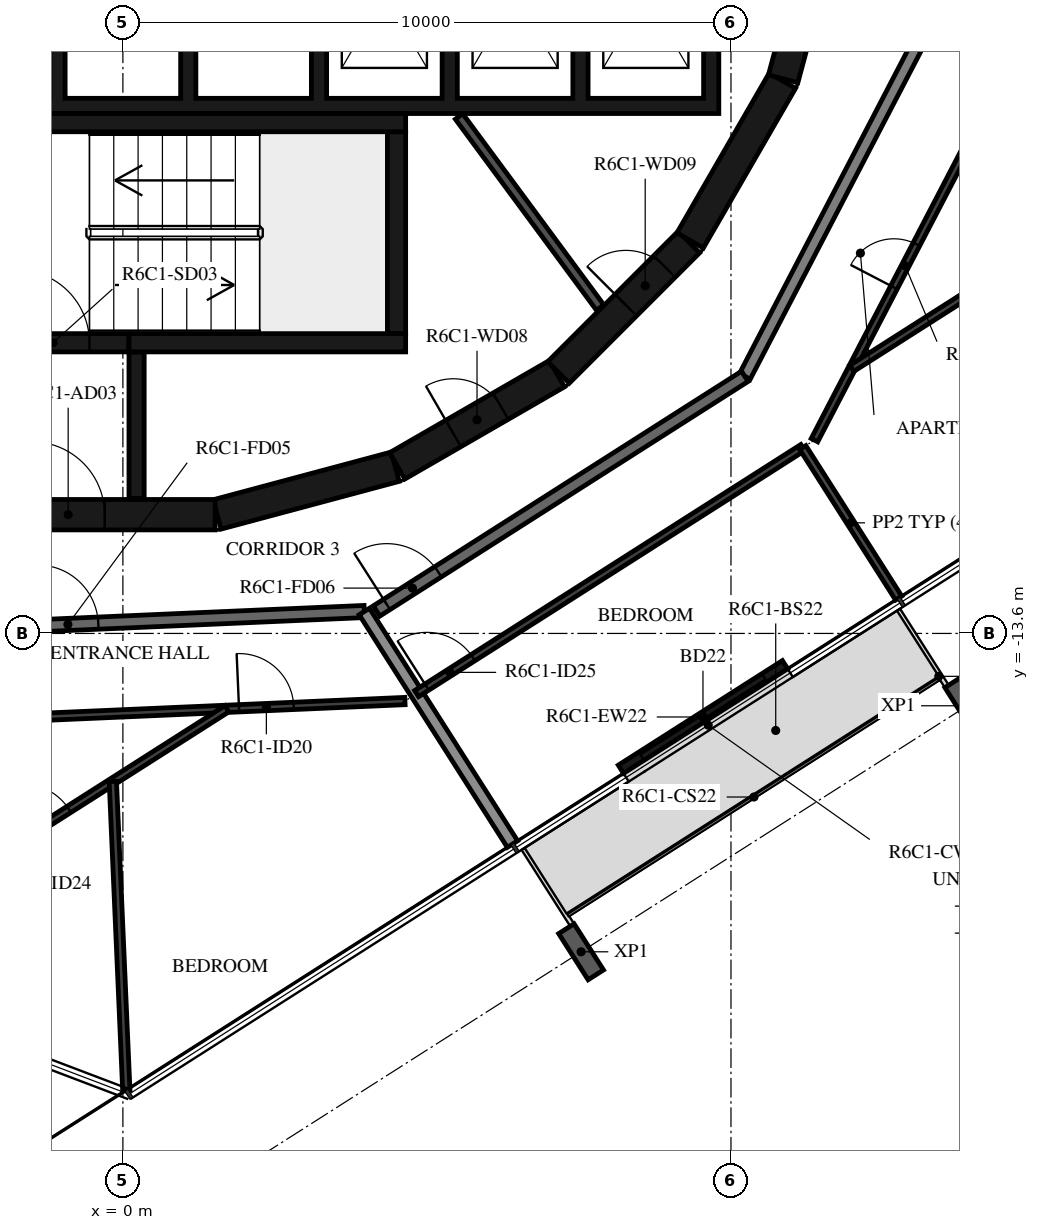
"""IFC4 building model, lengths in metres.
Left out: names, types, materials, properties, quantities, classifications, styles, units other than length and angle.
Written with IfcOpenShell. Run it as: python <this file> out.ifc"""

import sys

from ifc_helpers import new_model, si_unit, direction, frame, frame_2d, origin, origin_2d, place, context, subcontext, project, spatial, polyline, rectangle, i_section, outline, extrude, element, fill, save


model = new_model("IFC4")
c1 = context("Model", 3, precision=1e-05, world=origin(), true_north=direction((0.0, 1.0)))
c2 = subcontext(c1, "Body", "Model", "MODEL_VIEW")
j1 = project(units=[si_unit("LENGTHUNIT", "METRE"), si_unit("PLANEANGLEUNIT", "RADIAN")], contexts=[c1])
p1 = place(None, origin())
s1 = spatial("IfcSite", under=j1, at=p1, CompositionType="ELEMENT")
p2 = place(p1, origin())
s2 = spatial("IfcBuilding", under=s1, at=p2, CompositionType="ELEMENT")
p3 = place(p2, frame((0.0, 0.0, 251.2)))
s3 = spatial("IfcBuildingStorey", under=s2, at=p3, CompositionType="ELEMENT", Elevation=251.2)
for number, where, z_axis, x_axis in (
    (1, (13.886, -14.79, -0.38), (0.0, 0.0, 1.0), (-0.843, -0.537, 0.0)),
    (2, (7.535, -18.835, -0.38), (0.0, 0.0, 1.0), (-0.843, -0.537, 0.0)),
):
    element("IfcColumn", number, at=place(p3, frame(where, z_axis=z_axis, x_axis=x_axis)), inside=s3, PredefinedType="COLUMN", context=c2, shape_type="SweptSolid", body=[
        extrude(i_section(OverallWidth=0.3, OverallDepth=0.9, WebThickness=0.019, FlangeThickness=0.035, FilletRadius=0.03, at=origin_2d()), origin(), (0.0, 0.0, 1.0), 3.5),
    ])
p4 = place(p3, frame((8.19, -15.833, 0.0), z_axis=(0.0, 0.0, 1.0), x_axis=(0.843419508298, 0.53725555653, 0.0)))
e3 = element("IfcWall", 3, at=p4, inside=s3, PredefinedType="STANDARD", context=c2, shape_type="SweptSolid", body=[
    extrude(rectangle(XDim=3.2, YDim=0.16, at=frame_2d((1.6, 0.0))), origin(), (0.0, 0.0, 1.0), 3.12),
])
p5 = place(p4, frame((0.4, 0.0, 0.0)))
e4 = element("IfcOpeningElement", 4, at=p5, cuts=e3, PredefinedType="OPENING", context=c2, shape_type="SweptSolid", body=[
    extrude(rectangle(XDim=2.4, YDim=2.4, at=frame_2d((1.2, 1.2))), frame((0.0, 0.09, 0.0), z_axis=(0.0, -1.0, 0.0), x_axis=(1.0, 0.0, 0.0)), (0.0, 0.0, 1.0), 0.18),
])
p6 = place(p3, frame((1.55, -11.643, 0.0), z_axis=(0.0, 0.0, 1.0), x_axis=(0.965948410781, 0.258734743916, 0.0)))
e5 = element("IfcWall", 5, at=p6, inside=s3, PredefinedType="SHEAR", context=c2, shape_type="SweptSolid", body=[
    extrude(rectangle(XDim=3.033, YDim=0.5, at=frame_2d((1.516, 0.0))), origin(), (0.0, 0.0, 1.0), 3.12),
])
p7 = place(p3, frame((4.51, -10.845, 0.0), z_axis=(0.0, 0.0, 1.0), x_axis=(0.865975092491, 0.500087131594, 0.0)))
e6 = element("IfcWall", 6, at=p7, inside=s3, PredefinedType="SHEAR", context=c2, shape_type="SweptSolid", body=[
    extrude(rectangle(XDim=3.033, YDim=0.5, at=frame_2d((1.516, 0.0))), origin(), (0.0, 0.0, 1.0), 3.12),
])
p8 = place(p7, frame((1.066, 0.0, 0.0)))
e7 = element("IfcOpeningElement", 7, at=p8, cuts=e6, PredefinedType="OPENING", context=c2, shape_type="SweptSolid", body=[
    extrude(rectangle(XDim=0.9, YDim=2.1, at=frame_2d((0.45, 1.05))), frame((0.0, 0.26, 0.0), z_axis=(0.0, -1.0, 0.0), x_axis=(1.0, 0.0, 0.0)), (0.0, 0.0, 1.0), 0.52),
])
p9 = place(p3, frame((7.164, -9.308, 0.0), z_axis=(0.0, 0.0, 1.0), x_axis=(0.707106781187, 0.707106781187, 0.0)))
e8 = element("IfcWall", 8, at=p9, inside=s3, PredefinedType="SHEAR", context=c2, shape_type="SweptSolid", body=[
    extrude(rectangle(XDim=3.032, YDim=0.5, at=frame_2d((1.516, 0.0))), origin(), (0.0, 0.0, 1.0), 3.12),
])
p10 = place(p9, frame((1.566, 0.0, 0.0)))
e9 = element("IfcOpeningElement", 9, at=p10, cuts=e8, PredefinedType="OPENING", context=c2, shape_type="SweptSolid", body=[
    extrude(rectangle(XDim=0.9, YDim=2.1, at=frame_2d((0.45, 1.05))), frame((0.0, 0.26, 0.0), z_axis=(0.0, -1.0, 0.0), x_axis=(1.0, 0.0, 0.0)), (0.0, 0.0, 1.0), 0.52),
])
for number, where, z_axis, x_axis in (
    (10, (9.329, -7.137, 0.0), (0.0, 0.0, 1.0), (0.5, 0.866, 0.0)),
    (11, (10.858, -4.479, 0.0), (0.0, 0.0, 1.0), (0.259, 0.966, 0.0)),
):
    element("IfcWall", number, at=place(p3, frame(where, z_axis=z_axis, x_axis=x_axis)), inside=s3, PredefinedType="SHEAR", context=c2, shape_type="SweptSolid", body=[
        extrude(rectangle(XDim=3.033, YDim=0.5, at=frame_2d((1.516, 0.0))), origin(), (0.0, 0.0, 1.0), 3.12),
    ])
p11 = place(p3, frame((-1.516, -11.647, 0.0), z_axis=(0.0, 0.0, 1.0), x_axis=(1.0, 0.0, 0.0)))
e12 = element("IfcWall", 12, at=p11, inside=s3, PredefinedType="SHEAR", context=c2, shape_type="SweptSolid", body=[
    extrude(rectangle(XDim=3.033, YDim=0.5, at=frame_2d((1.516, 0.0))), origin(), (0.0, 0.0, 1.0), 3.12),
])
p12 = place(p11, frame((0.016, 0.0, 0.0)))
e13 = element("IfcOpeningElement", 13, at=p12, cuts=e12, PredefinedType="OPENING", context=c2, shape_type="SweptSolid", body=[
    extrude(rectangle(XDim=1.2, YDim=2.1, at=frame_2d((0.6, 1.05))), frame((0.0, 0.26, 0.0), z_axis=(0.0, -1.0, 0.0), x_axis=(1.0, 0.0, 0.0)), (0.0, 0.0, 1.0), 0.52),
])
p13 = place(p3, frame((-2.4, -5.2, 0.0), z_axis=(0.0, 0.0, 1.0), x_axis=(1.0, 0.0, 0.0)))
e14 = element("IfcWall", 14, at=p13, inside=s3, PredefinedType="SHEAR", context=c2, shape_type="SweptSolid", body=[
    extrude(rectangle(XDim=7.05, YDim=0.3, at=frame_2d((3.525, 0.0))), origin(), (0.0, 0.0, 1.0), 3.12),
])
p14 = place(p3, frame((4.5, -8.67, 0.0), z_axis=(0.0, 0.0, 1.0), x_axis=(0.0, 1.0, 0.0)))
e15 = element("IfcWall", 15, at=p14, inside=s3, PredefinedType="SHEAR", context=c2, shape_type="SweptSolid", body=[
    extrude(rectangle(XDim=3.32, YDim=0.3, at=frame_2d((1.66, 0.0))), origin(), (0.0, 0.0, 1.0), 3.12),
])
p15 = place(p3, frame((0.1, -8.82, 0.0), z_axis=(0.0, 0.0, 1.0), x_axis=(1.0, 0.0, 0.0)))
e16 = element("IfcWall", 16, at=p15, inside=s3, PredefinedType="SHEAR", context=c2, shape_type="SweptSolid", body=[
    extrude(rectangle(XDim=4.55, YDim=0.3, at=frame_2d((2.275, 0.0))), origin(), (0.0, 0.0, 1.0), 3.12),
])
p16 = place(p3, frame((-2.4, -8.82, 0.0), z_axis=(0.0, 0.0, 1.0), x_axis=(1.0, 0.0, 0.0)))
e17 = element("IfcWall", 17, at=p16, inside=s3, PredefinedType="SHEAR", context=c2, shape_type="SweptSolid", body=[
    extrude(rectangle(XDim=2.5, YDim=0.3, at=frame_2d((1.25, 0.0))), origin(), (0.0, 0.0, 1.0), 3.12),
])
p17 = place(p16, frame((0.65, 0.0, 0.0)))
e18 = element("IfcOpeningElement", 18, at=p17, cuts=e17, PredefinedType="OPENING", context=c2, shape_type="SweptSolid", body=[
    extrude(rectangle(XDim=1.2, YDim=2.1, at=frame_2d((0.6, 1.05))), frame((0.0, 0.16, 0.0), z_axis=(0.0, -1.0, 0.0), x_axis=(1.0, 0.0, 0.0)), (0.0, 0.0, 1.0), 0.32),
])
p18 = place(p3, frame((0.225, -8.97, 0.0), z_axis=(0.0, 0.0, 1.0), x_axis=(0.0, -1.0, 0.0)))
e19 = element("IfcWall", 19, at=p18, inside=s3, PredefinedType="SHEAR", context=c2, shape_type="SweptSolid", body=[
    extrude(rectangle(XDim=2.41, YDim=0.25, at=frame_2d((1.205, 0.0))), origin(), (0.0, 0.0, 1.0), 3.12),
])
p19 = place(p3, origin())
e20 = element("IfcWall", 20, at=p19, inside=s3, PredefinedType="SHEAR", context=c2, shape_type="SweptSolid", body=[
    extrude(outline(polyline([(9.8, -5.05), (9.8, -4.8), (9.8, -1.9), (9.55, -1.9), (9.55, -4.8), (7.65, -4.8), (7.65, -1.9), (7.4, -1.9), (7.4, -4.8), (5.5, -4.8), (5.5, -1.9), (5.25, -1.9), (5.25, -4.8), (3.35, -4.8), (3.35, -1.9), (3.1, -1.9), (3.1, -4.8), (1.2, -4.8), (1.2, -1.9), (0.95, -1.9), (0.95, -4.8), (-0.95, -4.8), (-0.95, -1.9), (-1.2, -1.9), (-1.2, -4.8), (-3.1, -4.8), (-3.1, -1.9), (-3.35, -1.9), (-3.35, -4.8), (-5.25, -4.8), (-5.25, -1.9), (-5.5, -1.9), (-5.5, -4.8), (-7.4, -4.8), (-7.4, -1.9), (-7.65, -1.9), (-7.65, -4.8), (-9.55, -4.8), (-9.55, -1.9), (-9.8, -1.9), (-9.8, -4.8), (-9.8, -5.05), (9.8, -5.05)])), origin(), (0.0, 0.0, 1.0), 3.12),
])
p20 = place(p3, frame((5.528, -5.098, 0.0), z_axis=(0.0, 0.0, 1.0), x_axis=(0.594034318069, -0.804439698769, 0.0)))
e21 = element("IfcWall", 21, at=p20, inside=s3, PredefinedType="PARTITIONING", context=c2, shape_type="SweptSolid", body=[
    extrude(rectangle(XDim=3.907, YDim=0.15, at=frame_2d((1.953, 0.0))), origin(), (0.0, 0.0, 1.0), 3.12),
])
p21 = place(p3, frame((10.228, -9.372, 0.0), z_axis=(0.0, 0.0, 1.0), x_axis=(0.461759464021, 0.887005184532, 0.0)))
e22 = element("IfcWall", 22, at=p21, inside=s3, PredefinedType="STANDARD", context=c2, shape_type="SweptSolid", body=[
    extrude(rectangle(XDim=7.181, YDim=0.2, at=frame_2d((3.591, 0.0))), origin(), (0.0, 0.0, 1.0), 3.12),
])
p22 = place(p3, frame((-3.003, -13.544, 0.0), z_axis=(0.0, 0.0, 1.0), x_axis=(0.999048221872, 0.043619380718, 0.0)))
e23 = element("IfcWall", 23, at=p22, inside=s3, PredefinedType="STANDARD", context=c2, shape_type="SweptSolid", body=[
    extrude(rectangle(XDim=6.979, YDim=0.2, at=frame_2d((3.49, 0.0))), origin(), (0.0, 0.0, 1.0), 3.12),
])
p23 = place(p22, frame((1.6, 0.0, 0.0)))
e24 = element("IfcOpeningElement", 24, at=p23, cuts=e23, PredefinedType="OPENING", context=c2, shape_type="SweptSolid", body=[
    extrude(rectangle(XDim=1.0, YDim=2.1, at=frame_2d((0.5, 1.05))), frame((0.0, 0.11, 0.0), z_axis=(0.0, -1.0, 0.0), x_axis=(1.0, 0.0, 0.0)), (0.0, 0.0, 1.0), 0.22),
])
p24 = place(p3, frame((4.172, -13.231, 0.0), z_axis=(0.0, 0.0, 1.0), x_axis=(0.843388394728, 0.537304397561, 0.0)))
e25 = element("IfcWall", 25, at=p24, inside=s3, PredefinedType="STANDARD", context=c2, shape_type="SweptSolid", body=[
    extrude(rectangle(XDim=7.181, YDim=0.2, at=frame_2d((3.59, 0.0))), origin(), (0.0, 0.0, 1.0), 3.12),
])
p25 = place(p24, frame((0.2, 0.0, 0.0)))
e26 = element("IfcOpeningElement", 26, at=p25, cuts=e25, PredefinedType="OPENING", context=c2, shape_type="SweptSolid", body=[
    extrude(rectangle(XDim=1.0, YDim=2.1, at=frame_2d((0.5, 1.05))), frame((0.0, 0.11, 0.0), z_axis=(0.0, -1.0, 0.0), x_axis=(1.0, 0.0, 0.0)), (0.0, 0.0, 1.0), 0.22),
])
p26 = place(p3, frame((6.407, -17.064, 0.0), z_axis=(0.0, 0.0, 1.0), x_axis=(-0.537324777979, 0.843375410461, 0.0)))
e27 = element("IfcWall", 27, at=p26, inside=s3, PredefinedType="STANDARD", context=c2, shape_type="SweptSolid", body=[
    extrude(rectangle(XDim=4.535, YDim=0.2, at=frame_2d((2.268, 0.0))), origin(), (0.0, 0.0, 1.0), 2.73),
])
p27 = place(p3, frame((-3.339, -15.06, 0.0), z_axis=(0.0, 0.0, 1.0), x_axis=(0.999047716945, 0.043630943905, 0.0)))
e28 = element("IfcWall", 28, at=p27, inside=s3, PredefinedType="PARTITIONING", context=c2, shape_type="SweptSolid", body=[
    extrude(rectangle(XDim=7.985, YDim=0.12, at=frame_2d((3.992, 0.0))), origin(), (0.0, 0.0, 1.0), 3.12),
])
p28 = place(p27, frame((5.253, 0.0, 0.0)))
e29 = element("IfcOpeningElement", 29, at=p28, cuts=e28, PredefinedType="OPENING", context=c2, shape_type="SweptSolid", body=[
    extrude(rectangle(XDim=0.9, YDim=2.1, at=frame_2d((0.45, 1.05))), frame((0.0, 0.07, 0.0), z_axis=(0.0, -1.0, 0.0), x_axis=(1.0, 0.0, 0.0)), (0.0, 0.0, 1.0), 0.14),
])
p29 = place(p3, frame((-6.932, -20.345, 0.0), z_axis=(0.0, 0.0, 1.0), x_axis=(0.843388627156, 0.537304032726, 0.0)))
e30 = element("IfcWall", 30, at=p29, inside=s3, PredefinedType="PARTITIONING", context=c2, shape_type="SweptSolid", body=[
    extrude(rectangle(XDim=10.246, YDim=0.12, at=frame_2d((5.123, 0.0))), origin(), (0.0, 0.0, 1.0), 3.12),
])
p30 = place(p29, frame((2.138, 0.0, 0.0)))
e31 = element("IfcOpeningElement", 31, at=p30, cuts=e30, PredefinedType="OPENING", context=c2, shape_type="SweptSolid", body=[
    extrude(rectangle(XDim=0.9, YDim=2.1, at=frame_2d((0.45, 1.05))), frame((0.0, 0.07, 0.0), z_axis=(0.0, -1.0, 0.0), x_axis=(1.0, 0.0, 0.0)), (0.0, 0.0, 1.0), 0.14),
])
p31 = place(p29, frame((6.268, 0.0, 0.0)))
e32 = element("IfcOpeningElement", 32, at=p31, cuts=e30, PredefinedType="OPENING", context=c2, shape_type="SweptSolid", body=[
    extrude(rectangle(XDim=0.9, YDim=2.1, at=frame_2d((0.45, 1.05))), frame((0.0, 0.07, 0.0), z_axis=(0.0, -1.0, 0.0), x_axis=(1.0, 0.0, 0.0)), (0.0, 0.0, 1.0), 0.14),
])
p32 = place(p3, frame((0.056, -21.11, 0.0), z_axis=(0.0, 0.0, 1.0), x_axis=(-0.043583193193, 0.999049801197, 0.0)))
e33 = element("IfcWall", 33, at=p32, inside=s3, PredefinedType="PARTITIONING", context=c2, shape_type="SweptSolid", body=[
    extrude(rectangle(XDim=5.081, YDim=0.12, at=frame_2d((2.541, 0.0))), origin(), (0.0, 0.0, 1.0), 3.12),
])
p33 = place(p3, frame((4.83, -14.59, 0.0), z_axis=(0.0, 0.0, 1.0), x_axis=(0.843393042763, 0.537297101629, 0.0)))
e34 = element("IfcWall", 34, at=p33, inside=s3, PredefinedType="PARTITIONING", context=c2, shape_type="SweptSolid", body=[
    extrude(rectangle(XDim=7.53, YDim=0.12, at=frame_2d((3.765, 0.0))), origin(), (0.0, 0.0, 1.0), 3.12),
])
p34 = place(p33, frame((0.2, 0.0, 0.0)))
e35 = element("IfcOpeningElement", 35, at=p34, cuts=e34, PredefinedType="OPENING", context=c2, shape_type="SweptSolid", body=[
    extrude(rectangle(XDim=0.9, YDim=2.1, at=frame_2d((0.45, 1.05))), frame((0.0, 0.07, 0.0), z_axis=(0.0, -1.0, 0.0), x_axis=(1.0, 0.0, 0.0)), (0.0, 0.0, 1.0), 0.14),
])
p35 = place(p3, frame((11.373, -10.421, 0.0), z_axis=(0.0, 0.0, 1.0), x_axis=(0.461738939635, 0.887015868869, 0.0)))
e36 = element("IfcWall", 36, at=p35, inside=s3, PredefinedType="PARTITIONING", context=c2, shape_type="SweptSolid", body=[
    extrude(rectangle(XDim=5.752, YDim=0.12, at=frame_2d((2.876, 0.0))), origin(), (0.0, 0.0, 1.0), 3.12),
])
p36 = place(p35, frame((2.831, 0.0, 0.0)))
e37 = element("IfcOpeningElement", 37, at=p36, cuts=e36, PredefinedType="OPENING", context=c2, shape_type="SweptSolid", body=[
    extrude(rectangle(XDim=0.8, YDim=2.1, at=frame_2d((0.4, 1.05))), frame((0.0, 0.07, 0.0), z_axis=(0.0, -1.0, 0.0), x_axis=(1.0, 0.0, 0.0)), (0.0, 0.0, 1.0), 0.14),
])
p37 = place(p3, frame((12.758, -13.018, 0.0), z_axis=(0.0, 0.0, 1.0), x_axis=(-0.537338423153, 0.843366716798, 0.0)))
e38 = element("IfcWall", 38, at=p37, inside=s3, PredefinedType="PARTITIONING", context=c2, shape_type="SweptSolid", body=[
    extrude(rectangle(XDim=2.934, YDim=0.12, at=frame_2d((1.467, 0.0))), origin(), (0.0, 0.0, 1.0), 2.73),
])
p38 = place(p3, frame((21.837, -2.966, 0.0), z_axis=(0.0, 0.0, 1.0), x_axis=(-0.843394529709, -0.537294767569, 0.0)))
e39 = element("IfcWall", 39, at=p38, inside=s3, PredefinedType="PARTITIONING", context=c2, shape_type="SweptSolid", body=[
    extrude(rectangle(XDim=11.678, YDim=0.12, at=frame_2d((5.839, 0.0))), origin(), (0.0, 0.0, 1.0), 3.12),
])
p39 = place(p38, frame((0.2, 0.0, 0.0)))
e40 = element("IfcOpeningElement", 40, at=p39, cuts=e39, PredefinedType="OPENING", context=c2, shape_type="SweptSolid", body=[
    extrude(rectangle(XDim=0.9, YDim=2.1, at=frame_2d((0.45, 1.05))), frame((0.0, 0.07, 0.0), z_axis=(0.0, -1.0, 0.0), x_axis=(1.0, 0.0, 0.0)), (0.0, 0.0, 1.0), 0.14),
])
p40 = place(p5, origin())
e41 = element("IfcDoor", 41, at=p40, inside=s3, OperationType="DOUBLE_DOOR_SLIDING", PredefinedType="DOOR", context=c2, shape_type="SweptSolid", body=[
    extrude(rectangle(XDim=2.4, YDim=2.4, at=frame_2d((1.2, 1.2))), frame((0.0, 0.025, 0.0), z_axis=(0.0, -1.0, 0.0), x_axis=(1.0, 0.0, 0.0)), (0.0, 0.0, 1.0), 0.05),
])
fill(e4, e41)
p41 = place(p17, origin())
e42 = element("IfcDoor", 42, at=p41, inside=s3, OperationType="SINGLE_SWING_LEFT", PredefinedType="DOOR", context=c2, shape_type="SweptSolid", body=[
    extrude(rectangle(XDim=1.2, YDim=2.1, at=frame_2d((0.6, 1.05))), frame((0.0, 0.025, 0.0), z_axis=(0.0, -1.0, 0.0), x_axis=(1.0, 0.0, 0.0)), (0.0, 0.0, 1.0), 0.05),
])
fill(e18, e42)
p42 = place(p12, origin())
e43 = element("IfcDoor", 43, at=p42, inside=s3, OperationType="SINGLE_SWING_RIGHT", PredefinedType="DOOR", context=c2, shape_type="SweptSolid", body=[
    extrude(rectangle(XDim=1.2, YDim=2.1, at=frame_2d((0.6, 1.05))), frame((0.0, 0.025, 0.0), z_axis=(0.0, -1.0, 0.0), x_axis=(1.0, 0.0, 0.0)), (0.0, 0.0, 1.0), 0.05),
])
fill(e13, e43)
p43 = place(p8, origin())
e44 = element("IfcDoor", 44, at=p43, inside=s3, OperationType="SINGLE_SWING_RIGHT", PredefinedType="DOOR", context=c2, shape_type="SweptSolid", body=[
    extrude(rectangle(XDim=0.9, YDim=2.1, at=frame_2d((0.45, 1.05))), frame((0.0, 0.025, 0.0), z_axis=(0.0, -1.0, 0.0), x_axis=(1.0, 0.0, 0.0)), (0.0, 0.0, 1.0), 0.05),
])
fill(e7, e44)
p44 = place(p10, origin())
e45 = element("IfcDoor", 45, at=p44, inside=s3, OperationType="SINGLE_SWING_LEFT", PredefinedType="DOOR", context=c2, shape_type="SweptSolid", body=[
    extrude(rectangle(XDim=0.9, YDim=2.1, at=frame_2d((0.45, 1.05))), frame((0.0, 0.025, 0.0), z_axis=(0.0, -1.0, 0.0), x_axis=(1.0, 0.0, 0.0)), (0.0, 0.0, 1.0), 0.05),
])
fill(e9, e45)
p45 = place(p23, origin())
e46 = element("IfcDoor", 46, at=p45, inside=s3, OperationType="SINGLE_SWING_LEFT", PredefinedType="DOOR", context=c2, shape_type="SweptSolid", body=[
    extrude(rectangle(XDim=1.0, YDim=2.1, at=frame_2d((0.5, 1.05))), frame((0.0, 0.025, 0.0), z_axis=(0.0, -1.0, 0.0), x_axis=(1.0, 0.0, 0.0)), (0.0, 0.0, 1.0), 0.05),
])
fill(e24, e46)
p46 = place(p28, origin())
e47 = element("IfcDoor", 47, at=p46, inside=s3, OperationType="SINGLE_SWING_LEFT", PredefinedType="DOOR", context=c2, shape_type="SweptSolid", body=[
    extrude(rectangle(XDim=0.9, YDim=2.1, at=frame_2d((0.45, 1.05))), frame((0.0, 0.025, 0.0), z_axis=(0.0, -1.0, 0.0), x_axis=(1.0, 0.0, 0.0)), (0.0, 0.0, 1.0), 0.05),
])
fill(e29, e47)
p47 = place(p31, origin())
e48 = element("IfcDoor", 48, at=p47, inside=s3, OperationType="SINGLE_SWING_RIGHT", PredefinedType="DOOR", context=c2, shape_type="SweptSolid", body=[
    extrude(rectangle(XDim=0.9, YDim=2.1, at=frame_2d((0.45, 1.05))), frame((0.0, 0.025, 0.0), z_axis=(0.0, -1.0, 0.0), x_axis=(1.0, 0.0, 0.0)), (0.0, 0.0, 1.0), 0.05),
])
fill(e32, e48)
p48 = place(p25, origin())
e49 = element("IfcDoor", 49, at=p48, inside=s3, OperationType="SINGLE_SWING_LEFT", PredefinedType="DOOR", context=c2, shape_type="SweptSolid", body=[
    extrude(rectangle(XDim=1.0, YDim=2.1, at=frame_2d((0.5, 1.05))), frame((0.0, 0.025, 0.0), z_axis=(0.0, -1.0, 0.0), x_axis=(1.0, 0.0, 0.0)), (0.0, 0.0, 1.0), 0.05),
])
fill(e26, e49)
p49 = place(p34, origin())
e50 = element("IfcDoor", 50, at=p49, inside=s3, OperationType="SINGLE_SWING_LEFT", PredefinedType="DOOR", context=c2, shape_type="SweptSolid", body=[
    extrude(rectangle(XDim=0.9, YDim=2.1, at=frame_2d((0.45, 1.05))), frame((0.0, 0.025, 0.0), z_axis=(0.0, -1.0, 0.0), x_axis=(1.0, 0.0, 0.0)), (0.0, 0.0, 1.0), 0.05),
])
fill(e35, e50)
p50 = place(p36, origin())
e51 = element("IfcDoor", 51, at=p50, inside=s3, OperationType="SINGLE_SWING_RIGHT", PredefinedType="DOOR", context=c2, shape_type="SweptSolid", body=[
    extrude(rectangle(XDim=0.8, YDim=2.1, at=frame_2d((0.4, 1.05))), frame((0.0, 0.025, 0.0), z_axis=(0.0, -1.0, 0.0), x_axis=(1.0, 0.0, 0.0)), (0.0, 0.0, 1.0), 0.05),
])
fill(e37, e51)
save(model, sys.argv[1])
